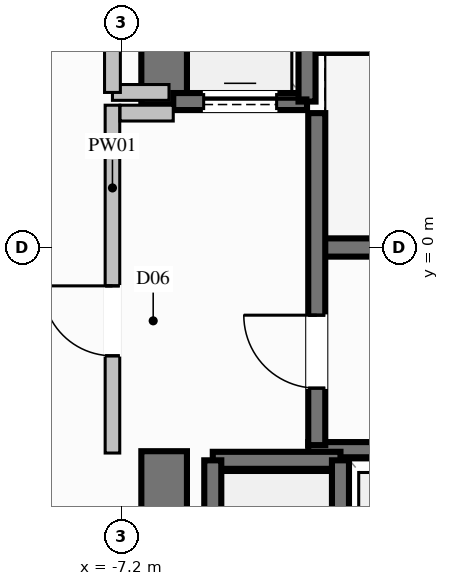
"""IFC4 building model, lengths in metres.
Left out: names, types, materials, properties, quantities, classifications, styles, units other than length and angle.
Written with IfcOpenShell. Run it as: python <this file> out.ifc"""

import sys

from ifc_helpers import new_model, si_unit, direction, frame, frame_2d, origin, place, context, subcontext, project, spatial, rectangle, extrude, element, fill, save


model = new_model("IFC4")
c1 = context("Model", 3, precision=1e-05, world=origin(), true_north=direction((0.0, 1.0)))
c2 = subcontext(c1, "Body", "Model", "MODEL_VIEW")
j1 = project(units=[si_unit("LENGTHUNIT", "METRE"), si_unit("PLANEANGLEUNIT", "RADIAN")], contexts=[c1])
p1 = place(None, origin())
s1 = spatial("IfcSite", under=j1, at=p1, CompositionType="ELEMENT")
p2 = place(p1, origin())
s2 = spatial("IfcBuilding", under=s1, at=p2, CompositionType="ELEMENT")
p3 = place(p2, frame((0.0, 0.0, 71.6)))
s3 = spatial("IfcBuildingStorey", under=s2, at=p3, CompositionType="ELEMENT", Elevation=71.6)
p4 = place(p3, frame((-3.99, 0.0, 0.0), z_axis=(0.0, 0.0, 1.0), x_axis=(1.0, 0.0, 0.0)))
e1 = element("IfcWall", 1, at=p4, inside=s3, PredefinedType="SHEAR", context=c2, shape_type="SweptSolid", body=[
    extrude(rectangle(XDim=7.98, YDim=0.3, at=frame_2d((3.99, 0.0))), origin(), (0.0, 0.0, 1.0), 3.6),
])
for number, where, z_axis, x_axis in (
    (2, (-4.13, -3.325, 0.0), (0.0, 0.0, 1.0), (1.0, 0.0, 0.0)),
    (3, (-4.13, 3.325, 0.0), (0.0, 0.0, 1.0), (1.0, 0.0, 0.0)),
):
    element("IfcWall", number, at=place(p3, frame(where, z_axis=z_axis, x_axis=x_axis)), inside=s3, PredefinedType="SOLIDWALL", context=c2, shape_type="SweptSolid", body=[
        extrude(rectangle(XDim=8.26, YDim=0.25, at=frame_2d((4.13, 0.0))), origin(), (0.0, 0.0, 1.0), 3.6),
    ])
p5 = place(p3, frame((-6.5, 2.35, 0.0), z_axis=(0.0, 0.0, 1.0), x_axis=(0.0, 1.0, 0.0)))
e4 = element("IfcWall", 4, at=p5, inside=s3, PredefinedType="SHEAR", context=c2, shape_type="SweptSolid", body=[
    extrude(rectangle(XDim=4.125, YDim=0.75, at=frame_2d((2.062, 0.0))), origin(), (0.0, 0.0, 1.0), 3.6),
])
p6 = place(p3, frame((-6.5, -6.475, 0.0), z_axis=(0.0, 0.0, 1.0), x_axis=(0.0, 1.0, 0.0)))
e5 = element("IfcWall", 5, at=p6, inside=s3, PredefinedType="SHEAR", context=c2, shape_type="SweptSolid", body=[
    extrude(rectangle(XDim=3.125, YDim=0.75, at=frame_2d((1.562, 0.0))), origin(), (0.0, 0.0, 1.0), 3.6),
])
p7 = place(p3, frame((-3.6, -3.5, 0.0), z_axis=(0.0, 0.0, 1.0), x_axis=(-1.0, 0.0, 0.0)))
e6 = element("IfcWall", 6, at=p7, inside=s3, PredefinedType="SOLIDWALL", context=c2, shape_type="SweptSolid", body=[
    extrude(rectangle(XDim=2.1, YDim=0.28, at=frame_2d((1.05, 0.0))), origin(), (0.0, 0.0, 1.0), 3.34),
])
for number, where, z_axis, x_axis in (
    (7, (-5.7, -3.5, 0.0), (0.0, 0.0, 1.0), (0.0, -1.0, 0.0)),
    (8, (-3.6, -6.0, 0.0), (0.0, 0.0, 1.0), (0.0, 1.0, 0.0)),
):
    element("IfcWall", number, at=place(p3, frame(where, z_axis=z_axis, x_axis=x_axis)), inside=s3, PredefinedType="SOLIDWALL", context=c2, shape_type="SweptSolid", body=[
        extrude(rectangle(XDim=2.5, YDim=0.28, at=frame_2d((1.25, 0.0))), origin(), (0.0, 0.0, 1.0), 3.34),
    ])
p8 = place(p3, frame((-6.35, 2.4, 0.0), z_axis=(0.0, 0.0, 1.0), x_axis=(1.0, 0.0, 0.0)))
e9 = element("IfcWall", 9, at=p8, inside=s3, PredefinedType="SOLIDWALL", context=c2, shape_type="SweptSolid", body=[
    extrude(rectangle(XDim=2.2, YDim=0.28, at=frame_2d((1.1, 0.0))), origin(), (0.0, 0.0, 1.0), 3.34),
])
p9 = place(p8, frame((0.5, 0.0, 0.0)))
e10 = element("IfcOpeningElement", 10, at=p9, cuts=e9, PredefinedType="OPENING", context=c2, shape_type="SweptSolid", body=[
    extrude(rectangle(XDim=1.2, YDim=2.2, at=frame_2d((0.6, 1.1))), frame((0.0, 0.15, 0.0), z_axis=(0.0, -1.0, 0.0), x_axis=(1.0, 0.0, 0.0)), (0.0, 0.0, 1.0), 0.3),
])
p10 = place(p3, frame((-4.15, 2.4, 0.0), z_axis=(0.0, 0.0, 1.0), x_axis=(0.0, 1.0, 0.0)))
e11 = element("IfcWall", 11, at=p10, inside=s3, PredefinedType="SOLIDWALL", context=c2, shape_type="SweptSolid", body=[
    extrude(rectangle(XDim=2.7, YDim=0.28, at=frame_2d((1.35, 0.0))), origin(), (0.0, 0.0, 1.0), 3.34),
])
p11 = place(p3, frame((-3.99, -3.25, 0.0), z_axis=(0.0, 0.0, 1.0), x_axis=(0.0, 1.0, 0.0)))
e12 = element("IfcWall", 12, at=p11, inside=s3, PredefinedType="SOLIDWALL", context=c2, shape_type="SweptSolid", body=[
    extrude(rectangle(XDim=5.46, YDim=0.28, at=frame_2d((2.73, 0.0))), origin(), (0.0, 0.0, 1.0), 3.34),
])
p12 = place(p11, frame((0.937, 0.0, 0.0)))
e13 = element("IfcOpeningElement", 13, at=p12, cuts=e12, PredefinedType="OPENING", context=c2, shape_type="SweptSolid", body=[
    extrude(rectangle(XDim=1.2, YDim=2.2, at=frame_2d((0.6, 1.1))), frame((0.0, 0.15, 0.0), z_axis=(0.0, -1.0, 0.0), x_axis=(1.0, 0.0, 0.0)), (0.0, 0.0, 1.0), 0.3),
])
p13 = place(p3, frame((-7.35, -3.38, 0.0), z_axis=(0.0, 0.0, 1.0), x_axis=(0.0, 1.0, 0.0)))
e14 = element("IfcWall", 14, at=p13, inside=s3, PredefinedType="PARTITIONING", context=c2, shape_type="SweptSolid", body=[
    extrude(rectangle(XDim=5.72, YDim=0.24, at=frame_2d((2.86, 0.0))), origin(), (0.0, 0.0, 1.0), 2.425),
])
p14 = place(p13, frame((1.599, 0.0, 0.0)))
e15 = element("IfcOpeningElement", 15, at=p14, cuts=e14, PredefinedType="OPENING", context=c2, shape_type="SweptSolid", body=[
    extrude(rectangle(XDim=1.15, YDim=2.2, at=frame_2d((0.575, 1.1))), frame((0.0, 0.13, 0.0), z_axis=(0.0, -1.0, 0.0), x_axis=(1.0, 0.0, 0.0)), (0.0, 0.0, 1.0), 0.26),
])
p15 = place(p3, frame((-7.225, 2.21, 0.0), z_axis=(0.0, 0.0, 1.0), x_axis=(1.0, 0.0, 0.0)))
e16 = element("IfcWall", 16, at=p15, inside=s3, PredefinedType="PARTITIONING", context=c2, shape_type="SweptSolid", body=[
    extrude(rectangle(XDim=0.875, YDim=0.26, at=frame_2d((0.438, 0.0))), origin(), (0.0, 0.0, 1.0), 3.34),
])
p16 = place(p3, frame((-7.35, 2.55, 0.0), z_axis=(0.0, 0.0, 1.0), x_axis=(1.0, 0.0, 0.0)))
e17 = element("IfcWall", 17, at=p16, inside=s3, PredefinedType="PARTITIONING", context=c2, shape_type="SweptSolid", body=[
    extrude(rectangle(XDim=0.93, YDim=0.26, at=frame_2d((0.465, 0.0))), origin(), (0.0, 0.0, 1.0), 3.34),
])
p17 = place(p3, frame((-7.35, 2.55, 0.0), z_axis=(0.0, 0.0, 1.0), x_axis=(0.0, 1.0, 0.0)))
e18 = element("IfcWall", 18, at=p17, inside=s3, PredefinedType="PARTITIONING", context=c2, shape_type="SweptSolid", body=[
    extrude(rectangle(XDim=2.4, YDim=0.26, at=frame_2d((1.2, 0.0))), origin(), (0.0, 0.0, 1.0), 2.425),
])
p18 = place(p17, frame((0.775, 0.0, 0.0)))
e19 = element("IfcOpeningElement", 19, at=p18, cuts=e18, PredefinedType="OPENING", context=c2, shape_type="SweptSolid", body=[
    extrude(rectangle(XDim=0.85, YDim=2.05, at=frame_2d((0.425, 1.025))), frame((0.0, 0.14, 0.0), z_axis=(0.0, -1.0, 0.0), x_axis=(1.0, 0.0, 0.0)), (0.0, 0.0, 1.0), 0.28),
])
p19 = place(p9, origin())
e20 = element("IfcDoor", 20, at=p19, inside=s3, OperationType="SLIDING_TO_LEFT", PredefinedType="DOOR", context=c2, shape_type="SweptSolid", body=[
    extrude(rectangle(XDim=1.2, YDim=2.2, at=frame_2d((0.6, 1.1))), frame((0.0, 0.025, 0.0), z_axis=(0.0, -1.0, 0.0), x_axis=(1.0, 0.0, 0.0)), (0.0, 0.0, 1.0), 0.05),
])
fill(e10, e20)
p20 = place(p12, origin())
e21 = element("IfcDoor", 21, at=p20, inside=s3, OperationType="SINGLE_SWING_RIGHT", PredefinedType="DOOR", context=c2, shape_type="SweptSolid", body=[
    extrude(rectangle(XDim=1.2, YDim=2.2, at=frame_2d((0.6, 1.1))), frame((0.0, 0.025, 0.0), z_axis=(0.0, -1.0, 0.0), x_axis=(1.0, 0.0, 0.0)), (0.0, 0.0, 1.0), 0.05),
])
fill(e13, e21)
p21 = place(p14, origin())
e22 = element("IfcDoor", 22, at=p21, inside=s3, OperationType="SINGLE_SWING_RIGHT", PredefinedType="DOOR", context=c2, shape_type="SweptSolid", body=[
    extrude(rectangle(XDim=1.15, YDim=2.2, at=frame_2d((0.575, 1.1))), frame((0.0, 0.025, 0.0), z_axis=(0.0, -1.0, 0.0), x_axis=(1.0, 0.0, 0.0)), (0.0, 0.0, 1.0), 0.05),
])
fill(e15, e22)
save(model, sys.argv[1])
